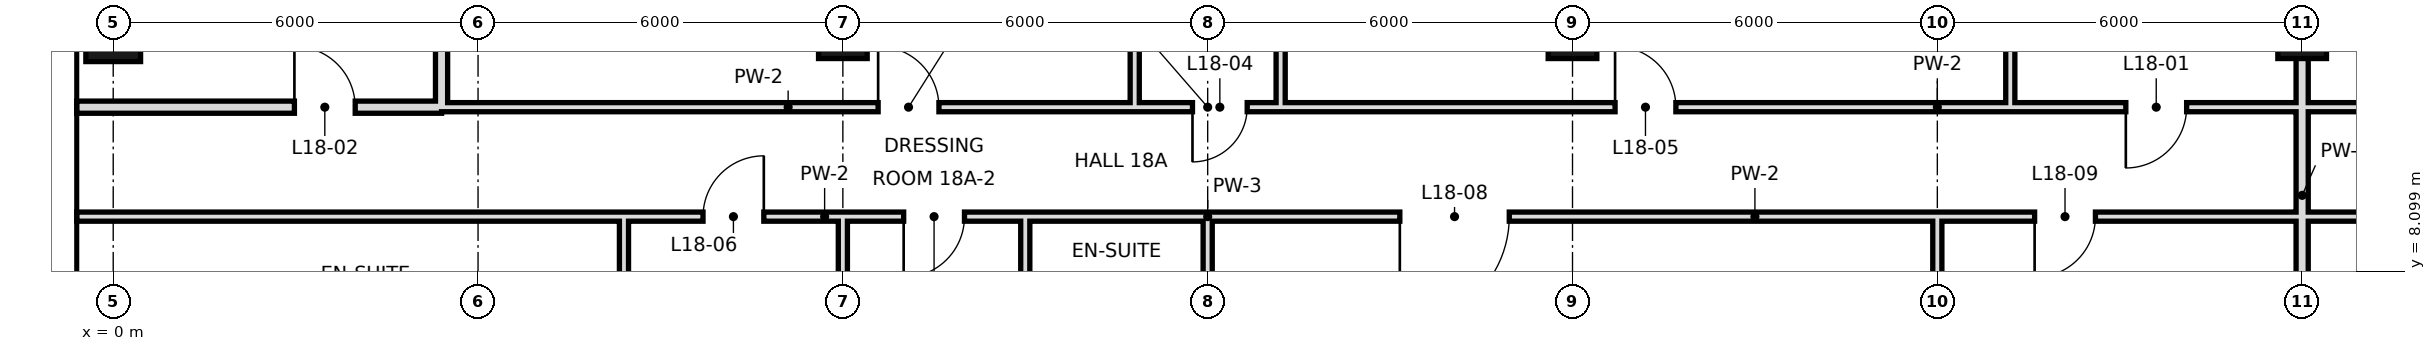
"""IFC4 building model, lengths in metres.
Left out: names, types, materials, properties, quantities, classifications, styles, units other than length and angle.
Written with IfcOpenShell. Run it as: python <this file> out.ifc"""

import sys

from ifc_helpers import new_model, si_unit, direction, frame, frame_2d, origin, origin_2d, place, context, subcontext, project, spatial, rectangle, hollow_rectangle, extrude, element, fill, save


model = new_model("IFC4")
c1 = context("Model", 3, precision=1e-05, world=origin(), true_north=direction((0.0, 1.0)))
c2 = subcontext(c1, "Body", "Model", "MODEL_VIEW")
j1 = project(units=[si_unit("LENGTHUNIT", "METRE"), si_unit("PLANEANGLEUNIT", "RADIAN")], contexts=[c1])
p1 = place(None, origin())
s1 = spatial("IfcSite", under=j1, at=p1, CompositionType="ELEMENT")
p2 = place(p1, origin())
s2 = spatial("IfcBuilding", under=s1, at=p2, CompositionType="ELEMENT")
p3 = place(p2, frame((0.0, 0.0, 85.8)))
s3 = spatial("IfcBuildingStorey", under=s2, at=p3, CompositionType="ELEMENT", Elevation=85.8)
p4 = place(p3, frame((0.0, 12.0, 0.0), z_axis=(0.0, 0.0, 1.0), x_axis=(1.0, 0.0, 0.0)))
e1 = element("IfcColumn", 1, at=p4, inside=s3, PredefinedType="COLUMN", context=c2, shape_type="SweptSolid", body=[
    extrude(hollow_rectangle(XDim=0.9, YDim=0.9, WallThickness=0.045, at=origin_2d()), origin(), (0.0, 0.0, 1.0), 4.4),
])
for number, where, z_axis, x_axis in (
    (2, (12.0, 12.0, 0.0), (0.0, 0.0, 1.0), (1.0, 0.0, 0.0)),
    (3, (24.0, 12.0, 0.0), (0.0, 0.0, 1.0), (1.0, 0.0, 0.0)),
    (4, (36.0, 12.0, 0.0), (0.0, 0.0, 1.0), (1.0, 0.0, 0.0)),
):
    element("IfcColumn", number, at=place(p3, frame(where, z_axis=z_axis, x_axis=x_axis)), inside=s3, PredefinedType="COLUMN", context=c2, shape_type="SweptSolid", body=[
        extrude(hollow_rectangle(XDim=0.8, YDim=0.8, WallThickness=0.04, at=origin_2d()), origin(), (0.0, 0.0, 1.0), 4.4),
    ])
p5 = place(p3, frame((12.0, 0.0, 0.0), z_axis=(0.0, 0.0, 1.0), x_axis=(0.0, 1.0, 0.0)))
e5 = element("IfcWall", 5, at=p5, inside=s3, PredefinedType="PARTITIONING", context=c2, shape_type="SweptSolid", body=[
    extrude(rectangle(XDim=9.0, YDim=0.15, at=frame_2d((4.5, 0.0))), origin(), (0.0, 0.0, 1.0), 3.4),
])
p6 = place(p3, frame((15.0, 6.0, 0.0), z_axis=(0.0, 0.0, 1.0), x_axis=(0.0, 1.0, 0.0)))
e6 = element("IfcWall", 6, at=p6, inside=s3, PredefinedType="PARTITIONING", context=c2, shape_type="SweptSolid", body=[
    extrude(rectangle(XDim=3.0, YDim=0.15, at=frame_2d((1.5, 0.0))), origin(), (0.0, 0.0, 1.0), 4.1),
])
p7 = place(p3, frame((16.8, 10.8, 0.0), z_axis=(0.0, 0.0, 1.0), x_axis=(0.0, 1.0, 0.0)))
e7 = element("IfcWall", 7, at=p7, inside=s3, PredefinedType="PARTITIONING", context=c2, shape_type="SweptSolid", body=[
    extrude(rectangle(XDim=7.9, YDim=0.15, at=frame_2d((3.95, 0.0))), origin(), (0.0, 0.0, 1.0), 4.1),
])
p8 = place(p3, frame((18.0, 6.0, 0.0), z_axis=(0.0, 0.0, 1.0), x_axis=(0.0, 1.0, 0.0)))
e8 = element("IfcWall", 8, at=p8, inside=s3, PredefinedType="PARTITIONING", context=c2, shape_type="SweptSolid", body=[
    extrude(rectangle(XDim=3.0, YDim=0.15, at=frame_2d((1.5, 0.0))), origin(), (0.0, 0.0, 1.0), 3.4),
])
p9 = place(p3, frame((19.2, 10.8, 0.0), z_axis=(0.0, 0.0, 1.0), x_axis=(0.0, 1.0, 0.0)))
e9 = element("IfcWall", 9, at=p9, inside=s3, PredefinedType="PARTITIONING", context=c2, shape_type="SweptSolid", body=[
    extrude(rectangle(XDim=7.9, YDim=0.15, at=frame_2d((3.95, 0.0))), origin(), (0.0, 0.0, 1.0), 4.1),
])
p10 = place(p3, frame((30.0, -0.6, 0.0), z_axis=(0.0, 0.0, 1.0), x_axis=(0.0, 1.0, 0.0)))
e10 = element("IfcWall", 10, at=p10, inside=s3, PredefinedType="PARTITIONING", context=c2, shape_type="SweptSolid", body=[
    extrude(rectangle(XDim=9.6, YDim=0.15, at=frame_2d((4.8, 0.0))), origin(), (0.0, 0.0, 1.0), 3.4),
])
p11 = place(p3, frame((31.2, 10.8, 0.0), z_axis=(0.0, 0.0, 1.0), x_axis=(0.0, 1.0, 0.0)))
e11 = element("IfcWall", 11, at=p11, inside=s3, PredefinedType="PARTITIONING", context=c2, shape_type="SweptSolid", body=[
    extrude(rectangle(XDim=7.9, YDim=0.15, at=frame_2d((3.95, 0.0))), origin(), (0.0, 0.0, 1.0), 4.1),
])
p12 = place(p3, frame((36.0, 0.0, 0.0), z_axis=(0.0, 0.0, 1.0), x_axis=(0.0, 1.0, 0.0)))
e12 = element("IfcWall", 12, at=p12, inside=s3, PredefinedType="SOLIDWALL", context=c2, shape_type="SweptSolid", body=[
    extrude(rectangle(XDim=18.7, YDim=0.2, at=frame_2d((9.35, 0.0))), origin(), (0.0, 0.0, 1.0), 3.4),
])
p13 = place(p3, frame((5.4, 10.8, 0.0), z_axis=(0.0, 0.0, 1.0), x_axis=(0.0, 1.0, 0.0)))
e13 = element("IfcWall", 13, at=p13, inside=s3, PredefinedType="SOLIDWALL", context=c2, shape_type="SweptSolid", body=[
    extrude(rectangle(XDim=7.9, YDim=0.2, at=frame_2d((3.95, 0.0))), origin(), (0.0, 0.0, 1.0), 3.4),
])
p14 = place(p3, frame((8.4, 6.0, 0.0), z_axis=(0.0, 0.0, 1.0), x_axis=(0.0, 1.0, 0.0)))
e14 = element("IfcWall", 14, at=p14, inside=s3, PredefinedType="PARTITIONING", context=c2, shape_type="SweptSolid", body=[
    extrude(rectangle(XDim=3.0, YDim=0.15, at=frame_2d((1.5, 0.0))), origin(), (0.0, 0.0, 1.0), 4.1),
])
p15 = place(p3, frame((-0.6, 10.8, 0.0), z_axis=(0.0, 0.0, 1.0), x_axis=(1.0, 0.0, 0.0)))
e15 = element("IfcWall", 15, at=p15, inside=s3, PredefinedType="SOLIDWALL", context=c2, shape_type="SweptSolid", body=[
    extrude(rectangle(XDim=6.0, YDim=0.2, at=frame_2d((3.0, 0.0))), origin(), (0.0, 0.0, 1.0), 3.65),
])
p16 = place(p15, frame((3.58, 0.0, 0.0)))
e16 = element("IfcOpeningElement", 16, at=p16, cuts=e15, PredefinedType="OPENING", context=c2, shape_type="SweptSolid", body=[
    extrude(rectangle(XDim=1.0, YDim=2.4, at=frame_2d((0.5, 1.2))), frame((0.0, 0.11, 0.0), z_axis=(0.0, -1.0, 0.0), x_axis=(1.0, 0.0, 0.0)), (0.0, 0.0, 1.0), 0.22),
])
p17 = place(p3, frame((5.4, 10.8, 0.0), z_axis=(0.0, 0.0, 1.0), x_axis=(1.0, 0.0, 0.0)))
e17 = element("IfcWall", 17, at=p17, inside=s3, PredefinedType="PARTITIONING", context=c2, shape_type="SweptSolid", body=[
    extrude(rectangle(XDim=11.4, YDim=0.15, at=frame_2d((5.7, 0.0))), origin(), (0.0, 0.0, 1.0), 4.1),
])
p18 = place(p17, frame((7.18, 0.0, 0.0)))
e18 = element("IfcOpeningElement", 18, at=p18, cuts=e17, PredefinedType="OPENING", context=c2, shape_type="SweptSolid", body=[
    extrude(rectangle(XDim=1.0, YDim=2.4, at=frame_2d((0.5, 1.2))), frame((0.0, 0.085, 0.0), z_axis=(0.0, -1.0, 0.0), x_axis=(1.0, 0.0, 0.0)), (0.0, 0.0, 1.0), 0.17),
])
p19 = place(p3, frame((19.2, 10.8, 0.0), z_axis=(0.0, 0.0, 1.0), x_axis=(1.0, 0.0, 0.0)))
e19 = element("IfcWall", 19, at=p19, inside=s3, PredefinedType="PARTITIONING", context=c2, shape_type="SweptSolid", body=[
    extrude(rectangle(XDim=21.6, YDim=0.15, at=frame_2d((10.8, 0.0))), origin(), (0.0, 0.0, 1.0), 4.1),
])
p20 = place(p19, frame((13.9, 0.0, 0.0)))
e20 = element("IfcOpeningElement", 20, at=p20, cuts=e19, PredefinedType="OPENING", context=c2, shape_type="SweptSolid", body=[
    extrude(rectangle(XDim=1.0, YDim=2.4, at=frame_2d((0.5, 1.2))), frame((0.0, 0.085, 0.0), z_axis=(0.0, -1.0, 0.0), x_axis=(1.0, 0.0, 0.0)), (0.0, 0.0, 1.0), 0.17),
])
p21 = place(p19, frame((5.5, 0.0, 0.0)))
e21 = element("IfcOpeningElement", 21, at=p21, cuts=e19, PredefinedType="OPENING", context=c2, shape_type="SweptSolid", body=[
    extrude(rectangle(XDim=1.0, YDim=2.4, at=frame_2d((0.5, 1.2))), frame((0.0, 0.085, 0.0), z_axis=(0.0, -1.0, 0.0), x_axis=(1.0, 0.0, 0.0)), (0.0, 0.0, 1.0), 0.17),
])
p22 = place(p19, frame((19.36, 0.0, 0.0)))
e22 = element("IfcOpeningElement", 22, at=p22, cuts=e19, PredefinedType="OPENING", context=c2, shape_type="SweptSolid", body=[
    extrude(rectangle(XDim=1.0, YDim=2.4, at=frame_2d((0.5, 1.2))), frame((0.0, 0.085, 0.0), z_axis=(0.0, -1.0, 0.0), x_axis=(1.0, 0.0, 0.0)), (0.0, 0.0, 1.0), 0.17),
])
p23 = place(p3, frame((16.8, 10.8, 0.0), z_axis=(0.0, 0.0, 1.0), x_axis=(1.0, 0.0, 0.0)))
e23 = element("IfcWall", 23, at=p23, inside=s3, PredefinedType="PARTITIONING", context=c2, shape_type="SweptSolid", body=[
    extrude(rectangle(XDim=2.4, YDim=0.15, at=frame_2d((1.2, 0.0))), origin(), (0.0, 0.0, 1.0), 4.1),
])
p24 = place(p23, frame((0.95, 0.0, 0.0)))
e24 = element("IfcOpeningElement", 24, at=p24, cuts=e23, PredefinedType="OPENING", context=c2, shape_type="SweptSolid", body=[
    extrude(rectangle(XDim=0.9, YDim=2.4, at=frame_2d((0.45, 1.2))), frame((0.0, 0.085, 0.0), z_axis=(0.0, -1.0, 0.0), x_axis=(1.0, 0.0, 0.0)), (0.0, 0.0, 1.0), 0.17),
])
p25 = place(p3, frame((8.4, 9.0, 0.0), z_axis=(0.0, 0.0, 1.0), x_axis=(1.0, 0.0, 0.0)))
e25 = element("IfcWall", 25, at=p25, inside=s3, PredefinedType="PARTITIONING", context=c2, shape_type="SweptSolid", body=[
    extrude(rectangle(XDim=6.6, YDim=0.15, at=frame_2d((3.3, 0.0))), origin(), (0.0, 0.0, 1.0), 4.1),
])
p26 = place(p25, frame((1.3, 0.0, 0.0)))
e26 = element("IfcOpeningElement", 26, at=p26, cuts=e25, PredefinedType="OPENING", context=c2, shape_type="SweptSolid", body=[
    extrude(rectangle(XDim=1.0, YDim=2.4, at=frame_2d((0.5, 1.2))), frame((0.0, 0.085, 0.0), z_axis=(0.0, -1.0, 0.0), x_axis=(1.0, 0.0, 0.0)), (0.0, 0.0, 1.0), 0.17),
])
p27 = place(p25, frame((4.6, 0.0, 0.0)))
e27 = element("IfcOpeningElement", 27, at=p27, cuts=e25, PredefinedType="OPENING", context=c2, shape_type="SweptSolid", body=[
    extrude(rectangle(XDim=1.0, YDim=2.4, at=frame_2d((0.5, 1.2))), frame((0.0, 0.085, 0.0), z_axis=(0.0, -1.0, 0.0), x_axis=(1.0, 0.0, 0.0)), (0.0, 0.0, 1.0), 0.17),
])
p28 = place(p3, frame((18.0, 9.0, 0.0), z_axis=(0.0, 0.0, 1.0), x_axis=(1.0, 0.0, 0.0)))
e28 = element("IfcWall", 28, at=p28, inside=s3, PredefinedType="PARTITIONING", context=c2, shape_type="SweptSolid", body=[
    extrude(rectangle(XDim=18.0, YDim=0.15, at=frame_2d((9.0, 0.0))), origin(), (0.0, 0.0, 1.0), 4.1),
])
p29 = place(p28, frame((3.16, 0.0, 0.0)))
e29 = element("IfcOpeningElement", 29, at=p29, cuts=e28, PredefinedType="OPENING", context=c2, shape_type="SweptSolid", body=[
    extrude(rectangle(XDim=1.8, YDim=2.4, at=frame_2d((0.9, 1.2))), frame((0.0, 0.085, 0.0), z_axis=(0.0, -1.0, 0.0), x_axis=(1.0, 0.0, 0.0)), (0.0, 0.0, 1.0), 0.17),
])
p30 = place(p28, frame((13.6, 0.0, 0.0)))
e30 = element("IfcOpeningElement", 30, at=p30, cuts=e28, PredefinedType="OPENING", context=c2, shape_type="SweptSolid", body=[
    extrude(rectangle(XDim=1.0, YDim=2.4, at=frame_2d((0.5, 1.2))), frame((0.0, 0.085, 0.0), z_axis=(0.0, -1.0, 0.0), x_axis=(1.0, 0.0, 0.0)), (0.0, 0.0, 1.0), 0.17),
])
p31 = place(p3, frame((-0.6, 9.0, 0.0), z_axis=(0.0, 0.0, 1.0), x_axis=(1.0, 0.0, 0.0)))
e31 = element("IfcWall", 31, at=p31, inside=s3, PredefinedType="PARTITIONING", context=c2, shape_type="SweptSolid", body=[
    extrude(rectangle(XDim=9.0, YDim=0.15, at=frame_2d((4.5, 0.0))), origin(), (0.0, 0.0, 1.0), 4.1),
])
p32 = place(p3, frame((15.0, 9.0, 0.0), z_axis=(0.0, 0.0, 1.0), x_axis=(1.0, 0.0, 0.0)))
e32 = element("IfcWall", 32, at=p32, inside=s3, PredefinedType="PARTITIONING", context=c2, shape_type="SweptSolid", body=[
    extrude(rectangle(XDim=3.0, YDim=0.15, at=frame_2d((1.5, 0.0))), origin(), (0.0, 0.0, 1.0), 4.1),
])
p33 = place(p3, frame((36.0, 9.0, 0.0), z_axis=(0.0, 0.0, 1.0), x_axis=(1.0, 0.0, 0.0)))
e33 = element("IfcWall", 33, at=p33, inside=s3, PredefinedType="PARTITIONING", context=c2, shape_type="SweptSolid", body=[
    extrude(rectangle(XDim=3.6, YDim=0.15, at=frame_2d((1.8, 0.0))), origin(), (0.0, 0.0, 1.0), 4.1),
])
p34 = place(p20, frame((1.0, 0.0, 0.0), z_axis=(0.0, 0.0, 1.0), x_axis=(-1.0, 0.0, 0.0)))
e34 = element("IfcDoor", 34, at=p34, inside=s3, OperationType="SINGLE_SWING_RIGHT", PredefinedType="DOOR", context=c2, shape_type="SweptSolid", body=[
    extrude(rectangle(XDim=1.0, YDim=2.4, at=frame_2d((0.5, 1.2))), frame((0.0, 0.025, 0.0), z_axis=(0.0, -1.0, 0.0), x_axis=(1.0, 0.0, 0.0)), (0.0, 0.0, 1.0), 0.05),
])
fill(e20, e34)
p35 = place(p16, origin())
e35 = element("IfcDoor", 35, at=p35, inside=s3, OperationType="SINGLE_SWING_LEFT", PredefinedType="DOOR", context=c2, shape_type="SweptSolid", body=[
    extrude(rectangle(XDim=1.0, YDim=2.4, at=frame_2d((0.5, 1.2))), frame((0.0, 0.025, 0.0), z_axis=(0.0, -1.0, 0.0), x_axis=(1.0, 0.0, 0.0)), (0.0, 0.0, 1.0), 0.05),
])
fill(e16, e35)
p36 = place(p18, origin())
e36 = element("IfcDoor", 36, at=p36, inside=s3, OperationType="SINGLE_SWING_LEFT", PredefinedType="DOOR", context=c2, shape_type="SweptSolid", body=[
    extrude(rectangle(XDim=1.0, YDim=2.4, at=frame_2d((0.5, 1.2))), frame((0.0, 0.025, 0.0), z_axis=(0.0, -1.0, 0.0), x_axis=(1.0, 0.0, 0.0)), (0.0, 0.0, 1.0), 0.05),
])
fill(e18, e36)
p37 = place(p24, frame((0.9, 0.0, 0.0), z_axis=(0.0, 0.0, 1.0), x_axis=(-1.0, 0.0, 0.0)))
e37 = element("IfcDoor", 37, at=p37, inside=s3, OperationType="SINGLE_SWING_RIGHT", PredefinedType="DOOR", context=c2, shape_type="SweptSolid", body=[
    extrude(rectangle(XDim=0.9, YDim=2.4, at=frame_2d((0.45, 1.2))), frame((0.0, 0.025, 0.0), z_axis=(0.0, -1.0, 0.0), x_axis=(1.0, 0.0, 0.0)), (0.0, 0.0, 1.0), 0.05),
])
fill(e24, e37)
p38 = place(p21, origin())
e38 = element("IfcDoor", 38, at=p38, inside=s3, OperationType="SINGLE_SWING_LEFT", PredefinedType="DOOR", context=c2, shape_type="SweptSolid", body=[
    extrude(rectangle(XDim=1.0, YDim=2.4, at=frame_2d((0.5, 1.2))), frame((0.0, 0.025, 0.0), z_axis=(0.0, -1.0, 0.0), x_axis=(1.0, 0.0, 0.0)), (0.0, 0.0, 1.0), 0.05),
])
fill(e21, e38)
p39 = place(p26, frame((1.0, 0.0, 0.0), z_axis=(0.0, 0.0, 1.0), x_axis=(-1.0, 0.0, 0.0)))
e39 = element("IfcDoor", 39, at=p39, inside=s3, OperationType="SINGLE_SWING_LEFT", PredefinedType="DOOR", context=c2, shape_type="SweptSolid", body=[
    extrude(rectangle(XDim=1.0, YDim=2.4, at=frame_2d((0.5, 1.2))), frame((0.0, 0.025, 0.0), z_axis=(0.0, -1.0, 0.0), x_axis=(1.0, 0.0, 0.0)), (0.0, 0.0, 1.0), 0.05),
])
fill(e26, e39)
p40 = place(p27, frame((1.0, 0.0, 0.0), z_axis=(0.0, 0.0, 1.0), x_axis=(-1.0, 0.0, 0.0)))
e40 = element("IfcDoor", 40, at=p40, inside=s3, OperationType="SINGLE_SWING_RIGHT", PredefinedType="DOOR", context=c2, shape_type="SweptSolid", body=[
    extrude(rectangle(XDim=1.0, YDim=2.4, at=frame_2d((0.5, 1.2))), frame((0.0, 0.025, 0.0), z_axis=(0.0, -1.0, 0.0), x_axis=(1.0, 0.0, 0.0)), (0.0, 0.0, 1.0), 0.05),
])
fill(e27, e40)
p41 = place(p29, frame((1.8, 0.0, 0.0), z_axis=(0.0, 0.0, 1.0), x_axis=(-1.0, 0.0, 0.0)))
e41 = element("IfcDoor", 41, at=p41, inside=s3, OperationType="SINGLE_SWING_RIGHT", PredefinedType="DOOR", context=c2, shape_type="SweptSolid", body=[
    extrude(rectangle(XDim=1.8, YDim=2.4, at=frame_2d((0.9, 1.2))), frame((0.0, 0.025, 0.0), z_axis=(0.0, -1.0, 0.0), x_axis=(1.0, 0.0, 0.0)), (0.0, 0.0, 1.0), 0.05),
])
fill(e29, e41)
p42 = place(p30, frame((1.0, 0.0, 0.0), z_axis=(0.0, 0.0, 1.0), x_axis=(-1.0, 0.0, 0.0)))
e42 = element("IfcDoor", 42, at=p42, inside=s3, OperationType="SINGLE_SWING_RIGHT", PredefinedType="DOOR", context=c2, shape_type="SweptSolid", body=[
    extrude(rectangle(XDim=1.0, YDim=2.4, at=frame_2d((0.5, 1.2))), frame((0.0, 0.025, 0.0), z_axis=(0.0, -1.0, 0.0), x_axis=(1.0, 0.0, 0.0)), (0.0, 0.0, 1.0), 0.05),
])
fill(e30, e42)
save(model, sys.argv[1])
